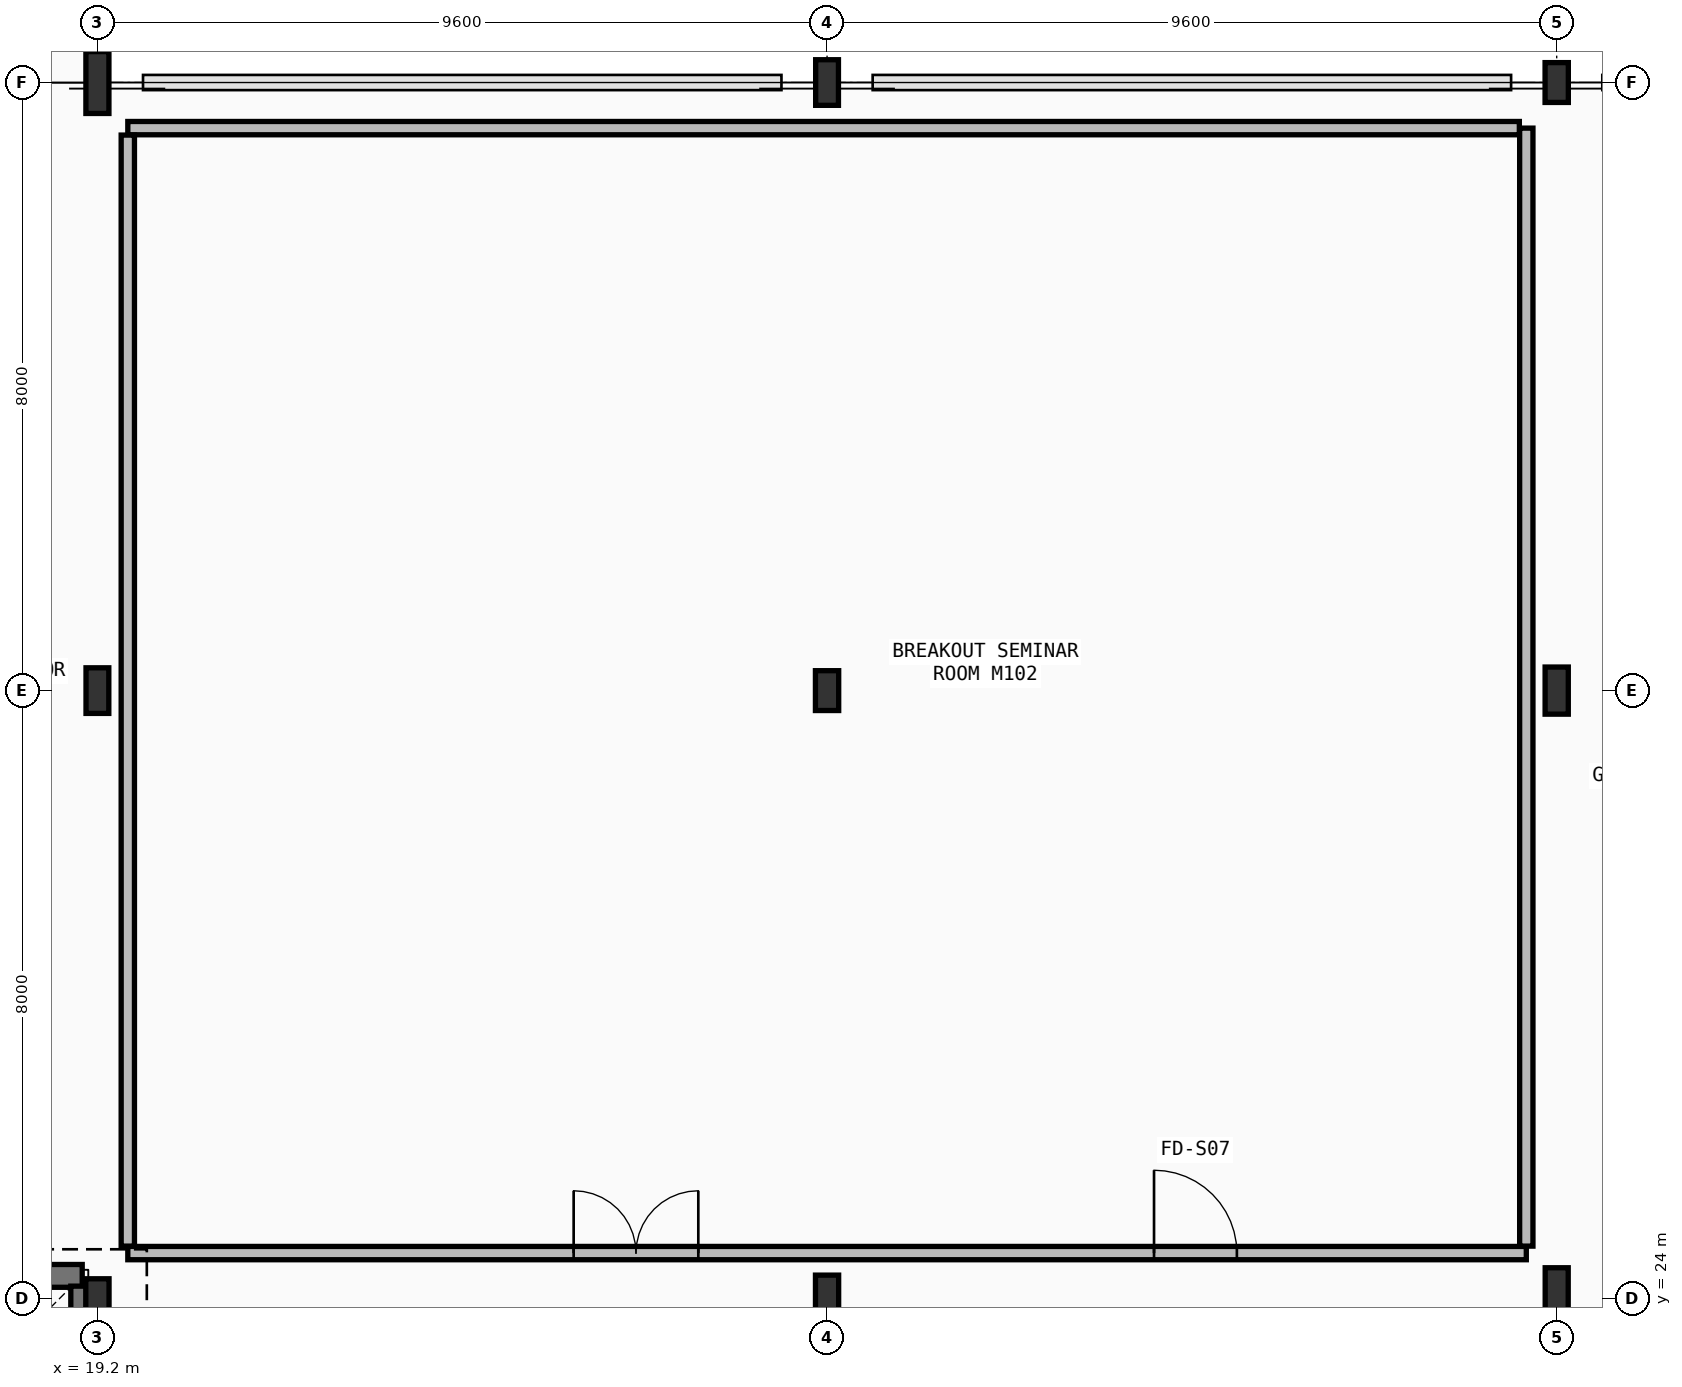
"""IFC4 building model, lengths in metres.
Left out: names, types, materials, properties, quantities, classifications, styles, units other than length and angle.
Written with IfcOpenShell. Run it as: python <this file> out.ifc"""

import sys

from ifc_helpers import new_model, si_unit, direction, frame, frame_2d, origin, origin_2d, place, context, subcontext, project, spatial, rectangle, i_section, extrude, element, fill, save


model = new_model("IFC4")
c1 = context("Model", 3, precision=1e-05, world=origin(), true_north=direction((0.0, 1.0)))
c2 = subcontext(c1, "Body", "Model", "MODEL_VIEW")
j1 = project(units=[si_unit("LENGTHUNIT", "METRE"), si_unit("PLANEANGLEUNIT", "RADIAN")], contexts=[c1])
p1 = place(None, origin())
s1 = spatial("IfcSite", under=j1, at=p1, CompositionType="ELEMENT")
p2 = place(p1, origin())
s2 = spatial("IfcBuilding", under=s1, at=p2, CompositionType="ELEMENT")
p3 = place(p2, frame((0.0, 0.0, 6.0)))
s3 = spatial("IfcBuildingStorey", under=s2, at=p3, CompositionType="ELEMENT", Elevation=6.0)
p4 = place(p3, frame((19.2, 24.0, 0.0), z_axis=(0.0, 0.0, 1.0), x_axis=(1.0, 0.0, 0.0)))
e1 = element("IfcColumn", 1, at=p4, inside=s3, PredefinedType="COLUMN", context=c2, shape_type="SweptSolid", body=[
    extrude(i_section(OverallWidth=0.306, OverallDepth=0.524, WebThickness=0.021, FlangeThickness=0.04, FilletRadius=0.027, at=origin_2d()), origin(), (0.0, 0.0, 1.0), 5.4),
])
p5 = place(p3, frame((19.2, 32.0, 0.0), z_axis=(0.0, 0.0, 1.0), x_axis=(1.0, 0.0, 0.0)))
e2 = element("IfcColumn", 2, at=p5, inside=s3, PredefinedType="COLUMN", context=c2, shape_type="SweptSolid", body=[
    extrude(i_section(OverallWidth=0.3, OverallDepth=0.6, WebThickness=0.015, FlangeThickness=0.03, FilletRadius=0.027, at=origin_2d()), origin(), (0.0, 0.0, 1.0), 5.4),
])
p6 = place(p3, frame((19.2, 40.0, 0.0), z_axis=(0.0, 0.0, 1.0), x_axis=(1.0, 0.0, 0.0)))
e3 = element("IfcColumn", 3, at=p6, inside=s3, PredefinedType="COLUMN", context=c2, shape_type="SweptSolid", body=[
    extrude(i_section(OverallWidth=0.303, OverallDepth=0.814, WebThickness=0.021, FlangeThickness=0.04, FilletRadius=0.03, at=origin_2d()), origin(), (0.0, 0.0, 1.0), 5.4),
])
p7 = place(p3, frame((28.8, 24.0, 0.0), z_axis=(0.0, 0.0, 1.0), x_axis=(1.0, 0.0, 0.0)))
e4 = element("IfcColumn", 4, at=p7, inside=s3, PredefinedType="COLUMN", context=c2, shape_type="SweptSolid", body=[
    extrude(i_section(OverallWidth=0.305, OverallDepth=0.62, WebThickness=0.021, FlangeThickness=0.04, FilletRadius=0.027, at=origin_2d()), origin(), (0.0, 0.0, 1.0), 5.4),
])
p8 = place(p3, frame((28.8, 32.0, 0.0), z_axis=(0.0, 0.0, 1.0), x_axis=(1.0, 0.0, 0.0)))
e5 = element("IfcColumn", 5, at=p8, inside=s3, PredefinedType="COLUMN", context=c2, shape_type="SweptSolid", body=[
    extrude(i_section(OverallWidth=0.306, OverallDepth=0.524, WebThickness=0.021, FlangeThickness=0.04, FilletRadius=0.027, at=origin_2d()), origin(), (0.0, 0.0, 1.0), 5.4),
])
p9 = place(p3, frame((28.8, 40.0, 0.0), z_axis=(0.0, 0.0, 1.0), x_axis=(1.0, 0.0, 0.0)))
e6 = element("IfcColumn", 6, at=p9, inside=s3, PredefinedType="COLUMN", context=c2, shape_type="SweptSolid", body=[
    extrude(i_section(OverallWidth=0.3, OverallDepth=0.6, WebThickness=0.015, FlangeThickness=0.03, FilletRadius=0.027, at=origin_2d()), origin(), (0.0, 0.0, 1.0), 5.4),
])
p10 = place(p3, frame((38.4, 24.0, 0.0), z_axis=(0.0, 0.0, 1.0), x_axis=(1.0, 0.0, 0.0)))
e7 = element("IfcColumn", 7, at=p10, inside=s3, PredefinedType="COLUMN", context=c2, shape_type="SweptSolid", body=[
    extrude(i_section(OverallWidth=0.303, OverallDepth=0.814, WebThickness=0.021, FlangeThickness=0.04, FilletRadius=0.03, at=origin_2d()), origin(), (0.0, 0.0, 1.0), 5.4),
])
p11 = place(p3, frame((38.4, 32.0, 0.0), z_axis=(0.0, 0.0, 1.0), x_axis=(1.0, 0.0, 0.0)))
e8 = element("IfcColumn", 8, at=p11, inside=s3, PredefinedType="COLUMN", context=c2, shape_type="SweptSolid", body=[
    extrude(i_section(OverallWidth=0.305, OverallDepth=0.62, WebThickness=0.021, FlangeThickness=0.04, FilletRadius=0.027, at=origin_2d()), origin(), (0.0, 0.0, 1.0), 5.4),
])
p12 = place(p3, frame((38.4, 40.0, 0.0), z_axis=(0.0, 0.0, 1.0), x_axis=(1.0, 0.0, 0.0)))
e9 = element("IfcColumn", 9, at=p12, inside=s3, PredefinedType="COLUMN", context=c2, shape_type="SweptSolid", body=[
    extrude(i_section(OverallWidth=0.306, OverallDepth=0.524, WebThickness=0.021, FlangeThickness=0.04, FilletRadius=0.027, at=origin_2d()), origin(), (0.0, 0.0, 1.0), 5.4),
])
p13 = place(p3, frame((19.0, 24.3, 0.0), z_axis=(0.0, 0.0, 1.0), x_axis=(-1.0, 0.0, 0.0)))
e10 = element("IfcWall", 10, at=p13, inside=s3, PredefinedType="SHEAR", context=c2, shape_type="SweptSolid", body=[
    extrude(rectangle(XDim=2.6, YDim=0.3, at=frame_2d((1.3, 0.0))), origin(), (0.0, 0.0, 1.0), 5.15),
])
p14 = place(p3, frame((19.0, 21.665, 0.0), z_axis=(0.0, 0.0, 1.0), x_axis=(0.0, 1.0, 0.0)))
e11 = element("IfcWall", 11, at=p14, inside=s3, PredefinedType="SHEAR", context=c2, shape_type="SweptSolid", body=[
    extrude(rectangle(XDim=2.5, YDim=0.3, at=frame_2d((1.25, 0.0))), origin(), (0.0, 0.0, 1.0), 5.15),
])
p15 = place(p3, frame((19.6, 24.6, 0.0), z_axis=(0.0, 0.0, 1.0), x_axis=(1.0, 0.0, 0.0)))
e12 = element("IfcWall", 12, at=p15, inside=s3, PredefinedType="PARTITIONING", context=c2, shape_type="SweptSolid", body=[
    extrude(rectangle(XDim=18.4, YDim=0.175, at=frame_2d((9.2, 0.0))), origin(), (0.0, 0.0, 1.0), 4.62),
])
p16 = place(p15, frame((5.866, 0.0, 0.0)))
e13 = element("IfcOpeningElement", 13, at=p16, cuts=e12, PredefinedType="OPENING", context=c2, shape_type="SweptSolid", body=[
    extrude(rectangle(XDim=1.64, YDim=2.2, at=frame_2d((0.82, 1.1))), frame((0.0, 0.097, 0.0), z_axis=(0.0, -1.0, 0.0), x_axis=(1.0, 0.0, 0.0)), (0.0, 0.0, 1.0), 0.195),
])
p17 = place(p15, frame((13.502, 0.0, 0.0)))
e14 = element("IfcOpeningElement", 14, at=p17, cuts=e12, PredefinedType="OPENING", context=c2, shape_type="SweptSolid", body=[
    extrude(rectangle(XDim=1.09, YDim=2.18, at=frame_2d((0.545, 1.09))), frame((0.0, 0.097, 0.0), z_axis=(0.0, -1.0, 0.0), x_axis=(1.0, 0.0, 0.0)), (0.0, 0.0, 1.0), 0.195),
])
p18 = place(p3, frame((38.0, 24.691, 0.0), z_axis=(0.0, 0.0, 1.0), x_axis=(0.0, 1.0, 0.0)))
e15 = element("IfcWall", 15, at=p18, inside=s3, PredefinedType="PARTITIONING", context=c2, shape_type="SweptSolid", body=[
    extrude(rectangle(XDim=14.708, YDim=0.175, at=frame_2d((7.354, 0.0))), origin(), (0.0, 0.0, 1.0), 4.57),
])
p19 = place(p3, frame((37.908, 39.4, 0.0), z_axis=(0.0, 0.0, 1.0), x_axis=(-1.0, 0.0, 0.0)))
e16 = element("IfcWall", 16, at=p19, inside=s3, PredefinedType="PARTITIONING", context=c2, shape_type="SweptSolid", body=[
    extrude(rectangle(XDim=18.308, YDim=0.175, at=frame_2d((9.154, 0.0))), origin(), (0.0, 0.0, 1.0), 4.52),
])
p20 = place(p3, frame((19.6, 39.309, 0.0), z_axis=(0.0, 0.0, 1.0), x_axis=(0.0, -1.0, 0.0)))
e17 = element("IfcWall", 17, at=p20, inside=s3, PredefinedType="PARTITIONING", context=c2, shape_type="SweptSolid", body=[
    extrude(rectangle(XDim=14.617, YDim=0.175, at=frame_2d((7.309, 0.0))), origin(), (0.0, 0.0, 1.0), 4.52),
])
p21 = place(p16, origin())
e18 = element("IfcDoor", 18, at=p21, inside=s3, OperationType="DOUBLE_DOOR_SINGLE_SWING", PredefinedType="DOOR", context=c2, shape_type="SweptSolid", body=[
    extrude(rectangle(XDim=1.64, YDim=2.2, at=frame_2d((0.82, 1.1))), frame((0.0, 0.025, 0.0), z_axis=(0.0, -1.0, 0.0), x_axis=(1.0, 0.0, 0.0)), (0.0, 0.0, 1.0), 0.05),
])
fill(e13, e18)
p22 = place(p17, origin())
e19 = element("IfcDoor", 19, at=p22, inside=s3, OperationType="SINGLE_SWING_RIGHT", PredefinedType="DOOR", context=c2, shape_type="SweptSolid", body=[
    extrude(rectangle(XDim=1.09, YDim=2.18, at=frame_2d((0.545, 1.09))), frame((0.0, 0.025, 0.0), z_axis=(0.0, -1.0, 0.0), x_axis=(1.0, 0.0, 0.0)), (0.0, 0.0, 1.0), 0.05),
])
fill(e14, e19)
save(model, sys.argv[1])
